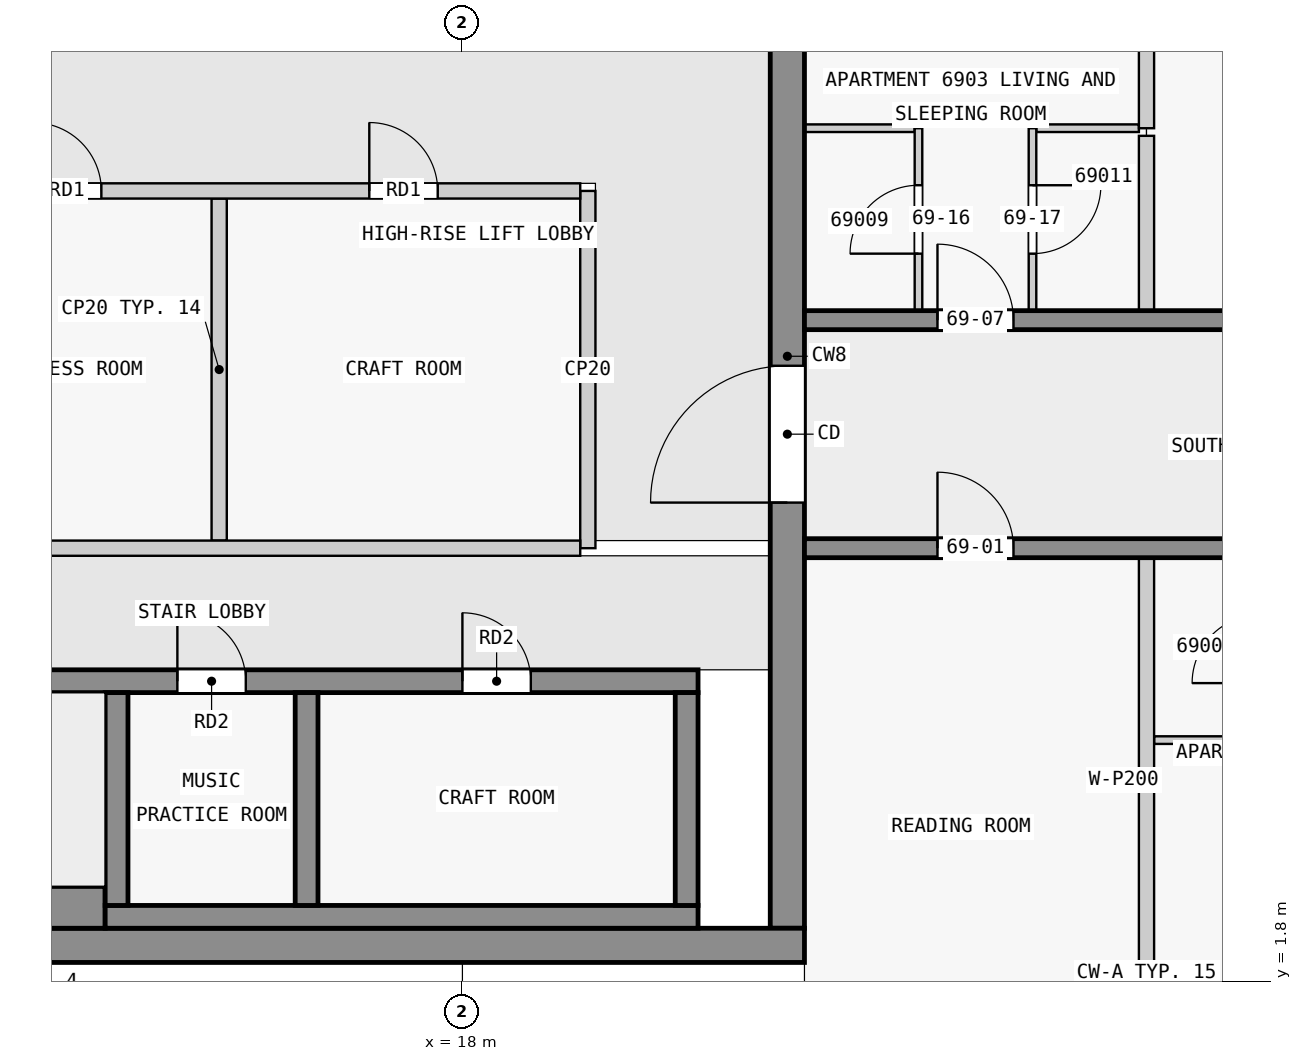
"""IFC4 building model, lengths in metres.
Left out: names, types, materials, properties, quantities, classifications, styles, units other than length and angle.
Written with IfcOpenShell. Run it as: python <this file> out.ifc"""

import sys

from ifc_helpers import new_model, si_unit, direction, frame, frame_2d, origin, place, context, subcontext, project, spatial, rectangle, extrude, element, fill, save


model = new_model("IFC4")
c1 = context("Model", 3, precision=1e-05, world=origin(), true_north=direction((0.0, 1.0)))
c2 = subcontext(c1, "Body", "Model", "MODEL_VIEW")
j1 = project(units=[si_unit("LENGTHUNIT", "METRE"), si_unit("PLANEANGLEUNIT", "RADIAN")], contexts=[c1])
p1 = place(None, origin())
s1 = spatial("IfcSite", under=j1, at=p1, CompositionType="ELEMENT")
p2 = place(p1, origin())
s2 = spatial("IfcBuilding", under=s1, at=p2, CompositionType="ELEMENT")
p3 = place(p2, frame((0.0, 0.0, 263.4)))
s3 = spatial("IfcBuildingStorey", under=s2, at=p3, CompositionType="ELEMENT", Elevation=263.4)
p4 = place(p3, frame((1.85, 2.275, 0.0), z_axis=(0.0, 0.0, 1.0), x_axis=(1.0, 0.0, 0.0)))
e1 = element("IfcWall", 1, at=p4, inside=s3, PredefinedType="SHEAR", context=c2, shape_type="SweptSolid", body=[
    extrude(rectangle(XDim=20.65, YDim=0.45, at=frame_2d((10.325, 0.0))), origin(), (0.0, 0.0, 1.0), 3.25),
])
p5 = place(p3, frame((22.275, 2.5, 0.0), z_axis=(0.0, 0.0, 1.0), x_axis=(0.0, 1.0, 0.0)))
e2 = element("IfcWall", 2, at=p5, inside=s3, PredefinedType="SHEAR", context=c2, shape_type="SweptSolid", body=[
    extrude(rectangle(XDim=15.05, YDim=0.45, at=frame_2d((7.525, 0.0))), origin(), (0.0, 0.0, 1.0), 3.25),
])
p6 = place(p5, frame((5.6, 0.0, 0.0)))
e3 = element("IfcOpeningElement", 3, at=p6, cuts=e2, PredefinedType="OPENING", context=c2, shape_type="SweptSolid", body=[
    extrude(rectangle(XDim=1.8, YDim=2.1, at=frame_2d((0.9, 1.05))), frame((0.0, 0.235, 0.0), z_axis=(0.0, -1.0, 0.0), x_axis=(1.0, 0.0, 0.0)), (0.0, 0.0, 1.0), 0.47),
])
p7 = place(p3, frame((6.9, 2.775, 0.0), z_axis=(0.0, 0.0, 1.0), x_axis=(1.0, 0.0, 0.0)))
e4 = element("IfcWall", 4, at=p7, inside=s3, PredefinedType="SHEAR", context=c2, shape_type="SweptSolid", body=[
    extrude(rectangle(XDim=6.4, YDim=0.55, at=frame_2d((3.2, 0.0))), origin(), (0.0, 0.0, 1.0), 3.25),
])
p8 = place(p3, frame((13.3, 2.65, 0.0), z_axis=(0.0, 0.0, 1.0), x_axis=(1.0, 0.0, 0.0)))
e5 = element("IfcWall", 5, at=p8, inside=s3, PredefinedType="SHEAR", context=c2, shape_type="SweptSolid", body=[
    extrude(rectangle(XDim=7.8, YDim=0.3, at=frame_2d((3.9, 0.0))), origin(), (0.0, 0.0, 1.0), 3.25),
])
for number, where, z_axis, x_axis in (
    (6, (13.45, 2.8, 0.0), (0.0, 0.0, 1.0), (0.0, 1.0, 0.0)),
    (7, (15.95, 2.8, 0.0), (0.0, 0.0, 1.0), (0.0, 1.0, 0.0)),
    (8, (20.95, 2.8, 0.0), (0.0, 0.0, 1.0), (0.0, 1.0, 0.0)),
):
    element("IfcWall", number, at=place(p3, frame(where, z_axis=z_axis, x_axis=x_axis)), inside=s3, PredefinedType="SHEAR", context=c2, shape_type="SweptSolid", body=[
        extrude(rectangle(XDim=2.8, YDim=0.3, at=frame_2d((1.4, 0.0))), origin(), (0.0, 0.0, 1.0), 3.25),
    ])
p9 = place(p3, frame((2.3, 5.75, 0.0), z_axis=(0.0, 0.0, 1.0), x_axis=(1.0, 0.0, 0.0)))
e9 = element("IfcWall", 9, at=p9, inside=s3, PredefinedType="SHEAR", context=c2, shape_type="SweptSolid", body=[
    extrude(rectangle(XDim=18.8, YDim=0.3, at=frame_2d((9.4, 0.0))), origin(), (0.0, 0.0, 1.0), 3.25),
])
p10 = place(p9, frame((4.65, 0.0, 0.0)))
e10 = element("IfcOpeningElement", 10, at=p10, cuts=e9, PredefinedType="OPENING", context=c2, shape_type="SweptSolid", body=[
    extrude(rectangle(XDim=1.1, YDim=2.1, at=frame_2d((0.55, 1.05))), frame((0.0, 0.16, 0.0), z_axis=(0.0, -1.0, 0.0), x_axis=(1.0, 0.0, 0.0)), (0.0, 0.0, 1.0), 0.32),
])
p11 = place(p9, frame((0.45, 0.0, 0.0)))
e11 = element("IfcOpeningElement", 11, at=p11, cuts=e9, PredefinedType="OPENING", context=c2, shape_type="SweptSolid", body=[
    extrude(rectangle(XDim=1.1, YDim=2.1, at=frame_2d((0.55, 1.05))), frame((0.0, 0.16, 0.0), z_axis=(0.0, -1.0, 0.0), x_axis=(1.0, 0.0, 0.0)), (0.0, 0.0, 1.0), 0.32),
])
p12 = place(p9, frame((2.75, 0.0, 0.0)))
e12 = element("IfcOpeningElement", 12, at=p12, cuts=e9, PredefinedType="OPENING", context=c2, shape_type="SweptSolid", body=[
    extrude(rectangle(XDim=1.1, YDim=2.1, at=frame_2d((0.55, 1.05))), frame((0.0, 0.16, 0.0), z_axis=(0.0, -1.0, 0.0), x_axis=(1.0, 0.0, 0.0)), (0.0, 0.0, 1.0), 0.32),
])
p13 = place(p9, frame((11.95, 0.0, 0.0)))
e13 = element("IfcOpeningElement", 13, at=p13, cuts=e9, PredefinedType="OPENING", context=c2, shape_type="SweptSolid", body=[
    extrude(rectangle(XDim=0.9, YDim=2.1, at=frame_2d((0.45, 1.05))), frame((0.0, 0.16, 0.0), z_axis=(0.0, -1.0, 0.0), x_axis=(1.0, 0.0, 0.0)), (0.0, 0.0, 1.0), 0.32),
])
p14 = place(p9, frame((15.7, 0.0, 0.0)))
e14 = element("IfcOpeningElement", 14, at=p14, cuts=e9, PredefinedType="OPENING", context=c2, shape_type="SweptSolid", body=[
    extrude(rectangle(XDim=0.9, YDim=2.1, at=frame_2d((0.45, 1.05))), frame((0.0, 0.16, 0.0), z_axis=(0.0, -1.0, 0.0), x_axis=(1.0, 0.0, 0.0)), (0.0, 0.0, 1.0), 0.32),
])
p15 = place(p3, frame((22.5, 7.5, 0.0), z_axis=(0.0, 0.0, 1.0), x_axis=(1.0, 0.0, 0.0)))
e15 = element("IfcWall", 15, at=p15, inside=s3, PredefinedType="SHEAR", context=c2, shape_type="SweptSolid", body=[
    extrude(rectangle(XDim=22.5, YDim=0.25, at=frame_2d((11.25, 0.0))), origin(), (0.0, 0.0, 1.0), 3.25),
])
p16 = place(p15, frame((1.75, 0.0, 0.0)))
e16 = element("IfcOpeningElement", 16, at=p16, cuts=e15, PredefinedType="OPENING", context=c2, shape_type="SweptSolid", body=[
    extrude(rectangle(XDim=1.0, YDim=2.1, at=frame_2d((0.5, 1.05))), frame((0.0, 0.135, 0.0), z_axis=(0.0, -1.0, 0.0), x_axis=(1.0, 0.0, 0.0)), (0.0, 0.0, 1.0), 0.27),
])
p17 = place(p15, frame((6.25, 0.0, 0.0)))
e17 = element("IfcOpeningElement", 17, at=p17, cuts=e15, PredefinedType="OPENING", context=c2, shape_type="SweptSolid", body=[
    extrude(rectangle(XDim=1.0, YDim=2.1, at=frame_2d((0.5, 1.05))), frame((0.0, 0.135, 0.0), z_axis=(0.0, -1.0, 0.0), x_axis=(1.0, 0.0, 0.0)), (0.0, 0.0, 1.0), 0.27),
])
p18 = place(p15, frame((10.35, 0.0, 0.0)))
e18 = element("IfcOpeningElement", 18, at=p18, cuts=e15, PredefinedType="OPENING", context=c2, shape_type="SweptSolid", body=[
    extrude(rectangle(XDim=1.8, YDim=2.1, at=frame_2d((0.9, 1.05))), frame((0.0, 0.135, 0.0), z_axis=(0.0, -1.0, 0.0), x_axis=(1.0, 0.0, 0.0)), (0.0, 0.0, 1.0), 0.27),
])
p19 = place(p15, frame((15.25, 0.0, 0.0)))
e19 = element("IfcOpeningElement", 19, at=p19, cuts=e15, PredefinedType="OPENING", context=c2, shape_type="SweptSolid", body=[
    extrude(rectangle(XDim=1.0, YDim=2.1, at=frame_2d((0.5, 1.05))), frame((0.0, 0.135, 0.0), z_axis=(0.0, -1.0, 0.0), x_axis=(1.0, 0.0, 0.0)), (0.0, 0.0, 1.0), 0.27),
])
p20 = place(p15, frame((18.75, 0.0, 0.0)))
e20 = element("IfcOpeningElement", 20, at=p20, cuts=e15, PredefinedType="OPENING", context=c2, shape_type="SweptSolid", body=[
    extrude(rectangle(XDim=0.9, YDim=2.1, at=frame_2d((0.45, 1.05))), frame((0.0, 0.135, 0.0), z_axis=(0.0, -1.0, 0.0), x_axis=(1.0, 0.0, 0.0)), (0.0, 0.0, 1.0), 0.27),
])
p21 = place(p15, frame((20.95, 0.0, 0.0)))
e21 = element("IfcOpeningElement", 21, at=p21, cuts=e15, PredefinedType="OPENING", context=c2, shape_type="SweptSolid", body=[
    extrude(rectangle(XDim=1.0, YDim=2.1, at=frame_2d((0.5, 1.05))), frame((0.0, 0.135, 0.0), z_axis=(0.0, -1.0, 0.0), x_axis=(1.0, 0.0, 0.0)), (0.0, 0.0, 1.0), 0.27),
])
p22 = place(p3, frame((22.5, 10.5, 0.0), z_axis=(0.0, 0.0, 1.0), x_axis=(1.0, 0.0, 0.0)))
e22 = element("IfcWall", 22, at=p22, inside=s3, PredefinedType="SHEAR", context=c2, shape_type="SweptSolid", body=[
    extrude(rectangle(XDim=22.5, YDim=0.25, at=frame_2d((11.25, 0.0))), origin(), (0.0, 0.0, 1.0), 3.25),
])
p23 = place(p22, frame((1.75, 0.0, 0.0)))
e23 = element("IfcOpeningElement", 23, at=p23, cuts=e22, PredefinedType="OPENING", context=c2, shape_type="SweptSolid", body=[
    extrude(rectangle(XDim=1.0, YDim=2.1, at=frame_2d((0.5, 1.05))), frame((0.0, 0.135, 0.0), z_axis=(0.0, -1.0, 0.0), x_axis=(1.0, 0.0, 0.0)), (0.0, 0.0, 1.0), 0.27),
])
p24 = place(p22, frame((8.55, 0.0, 0.0)))
e24 = element("IfcOpeningElement", 24, at=p24, cuts=e22, PredefinedType="OPENING", context=c2, shape_type="SweptSolid", body=[
    extrude(rectangle(XDim=1.0, YDim=2.1, at=frame_2d((0.5, 1.05))), frame((0.0, 0.135, 0.0), z_axis=(0.0, -1.0, 0.0), x_axis=(1.0, 0.0, 0.0)), (0.0, 0.0, 1.0), 0.27),
])
p25 = place(p22, frame((16.85, 0.0, 0.0)))
e25 = element("IfcOpeningElement", 25, at=p25, cuts=e22, PredefinedType="OPENING", context=c2, shape_type="SweptSolid", body=[
    extrude(rectangle(XDim=1.0, YDim=2.1, at=frame_2d((0.5, 1.05))), frame((0.0, 0.135, 0.0), z_axis=(0.0, -1.0, 0.0), x_axis=(1.0, 0.0, 0.0)), (0.0, 0.0, 1.0), 0.27),
])
p26 = place(p3, frame((10.9, 7.5, 0.0), z_axis=(0.0, 0.0, 1.0), x_axis=(1.0, 0.0, 0.0)))
e26 = element("IfcWall", 26, at=p26, inside=s3, PredefinedType="PARTITIONING", context=c2, shape_type="SweptSolid", body=[
    extrude(rectangle(XDim=8.65, YDim=0.2, at=frame_2d((4.325, 0.0))), origin(), (0.0, 0.0, 1.0), 3.25),
])
p27 = place(p3, frame((19.65, 7.5, 0.0), z_axis=(0.0, 0.0, 1.0), x_axis=(0.0, 1.0, 0.0)))
e27 = element("IfcWall", 27, at=p27, inside=s3, PredefinedType="PARTITIONING", context=c2, shape_type="SweptSolid", body=[
    extrude(rectangle(XDim=4.7, YDim=0.2, at=frame_2d((2.35, 0.0))), origin(), (0.0, 0.0, 1.0), 3.25),
])
p28 = place(p3, frame((10.9, 12.2, 0.0), z_axis=(0.0, 0.0, 1.0), x_axis=(1.0, 0.0, 0.0)))
e28 = element("IfcWall", 28, at=p28, inside=s3, PredefinedType="PARTITIONING", context=c2, shape_type="SweptSolid", body=[
    extrude(rectangle(XDim=8.65, YDim=0.2, at=frame_2d((4.325, 0.0))), origin(), (0.0, 0.0, 1.0), 3.25),
])
p29 = place(p28, frame((1.45, 0.0, 0.0)))
e29 = element("IfcOpeningElement", 29, at=p29, cuts=e28, PredefinedType="OPENING", context=c2, shape_type="SweptSolid", body=[
    extrude(rectangle(XDim=0.9, YDim=2.1, at=frame_2d((0.45, 1.05))), frame((0.0, 0.11, 0.0), z_axis=(0.0, -1.0, 0.0), x_axis=(1.0, 0.0, 0.0)), (0.0, 0.0, 1.0), 0.22),
])
p30 = place(p28, frame((5.875, 0.0, 0.0)))
e30 = element("IfcOpeningElement", 30, at=p30, cuts=e28, PredefinedType="OPENING", context=c2, shape_type="SweptSolid", body=[
    extrude(rectangle(XDim=0.9, YDim=2.1, at=frame_2d((0.45, 1.05))), frame((0.0, 0.11, 0.0), z_axis=(0.0, -1.0, 0.0), x_axis=(1.0, 0.0, 0.0)), (0.0, 0.0, 1.0), 0.22),
])
p31 = place(p3, frame((14.8, 7.6, 0.0), z_axis=(0.0, 0.0, 1.0), x_axis=(0.0, 1.0, 0.0)))
e31 = element("IfcWall", 31, at=p31, inside=s3, PredefinedType="PARTITIONING", context=c2, shape_type="SweptSolid", body=[
    extrude(rectangle(XDim=4.5, YDim=0.2, at=frame_2d((2.25, 0.0))), origin(), (0.0, 0.0, 1.0), 3.25),
])
p32 = place(p3, frame((27.1, 4.975, 0.0), z_axis=(0.0, 0.0, 1.0), x_axis=(1.0, 0.0, 0.0)))
e32 = element("IfcWall", 32, at=p32, inside=s3, PredefinedType="PARTITIONING", context=c2, shape_type="SweptSolid", body=[
    extrude(rectangle(XDim=1.35, YDim=0.1, at=frame_2d((0.675, 0.0))), origin(), (0.0, 0.0, 1.0), 3.25),
])
p33 = place(p3, frame((23.95, 13.025, 0.0), z_axis=(0.0, 0.0, 1.0), x_axis=(-1.0, 0.0, 0.0)))
e33 = element("IfcWall", 33, at=p33, inside=s3, PredefinedType="PARTITIONING", context=c2, shape_type="SweptSolid", body=[
    extrude(rectangle(XDim=1.45, YDim=0.1, at=frame_2d((0.725, 0.0))), origin(), (0.0, 0.0, 1.0), 3.25),
])
p34 = place(p3, frame((26.9, 13.025, 0.0), z_axis=(0.0, 0.0, 1.0), x_axis=(-1.0, 0.0, 0.0)))
e34 = element("IfcWall", 34, at=p34, inside=s3, PredefinedType="PARTITIONING", context=c2, shape_type="SweptSolid", body=[
    extrude(rectangle(XDim=1.35, YDim=0.1, at=frame_2d((0.675, 0.0))), origin(), (0.0, 0.0, 1.0), 3.25),
])
p35 = place(p3, frame((24.0, 10.625, 0.0), z_axis=(0.0, 0.0, 1.0), x_axis=(0.0, 1.0, 0.0)))
e35 = element("IfcWall", 35, at=p35, inside=s3, PredefinedType="PARTITIONING", context=c2, shape_type="SweptSolid", body=[
    extrude(rectangle(XDim=2.4, YDim=0.1, at=frame_2d((1.2, 0.0))), origin(), (0.0, 0.0, 1.0), 3.25),
])
p36 = place(p35, frame((0.75, 0.0, 0.0)))
e36 = element("IfcOpeningElement", 36, at=p36, cuts=e35, PredefinedType="OPENING", context=c2, shape_type="SweptSolid", body=[
    extrude(rectangle(XDim=0.9, YDim=2.1, at=frame_2d((0.45, 1.05))), frame((0.0, 0.06, 0.0), z_axis=(0.0, -1.0, 0.0), x_axis=(1.0, 0.0, 0.0)), (0.0, 0.0, 1.0), 0.12),
])
p37 = place(p3, frame((25.5, 13.025, 0.0), z_axis=(0.0, 0.0, 1.0), x_axis=(0.0, -1.0, 0.0)))
e37 = element("IfcWall", 37, at=p37, inside=s3, PredefinedType="PARTITIONING", context=c2, shape_type="SweptSolid", body=[
    extrude(rectangle(XDim=2.4, YDim=0.1, at=frame_2d((1.2, 0.0))), origin(), (0.0, 0.0, 1.0), 3.25),
])
p38 = place(p37, frame((0.75, 0.0, 0.0)))
e38 = element("IfcOpeningElement", 38, at=p38, cuts=e37, PredefinedType="OPENING", context=c2, shape_type="SweptSolid", body=[
    extrude(rectangle(XDim=0.9, YDim=2.1, at=frame_2d((0.45, 1.05))), frame((0.0, 0.06, 0.0), z_axis=(0.0, -1.0, 0.0), x_axis=(1.0, 0.0, 0.0)), (0.0, 0.0, 1.0), 0.12),
])
p39 = place(p3, frame((27.0, 16.473, 0.0), z_axis=(0.0, 0.0, 1.0), x_axis=(0.0, -1.0, 0.0)))
e39 = element("IfcWall", 39, at=p39, inside=s3, PredefinedType="PARTITIONING", context=c2, shape_type="SweptSolid", body=[
    extrude(rectangle(XDim=3.448, YDim=0.2, at=frame_2d((1.724, 0.0))), origin(), (0.0, 0.0, 1.0), 3.25),
])
p40 = place(p3, frame((27.0, 1.527, 0.0), z_axis=(0.0, 0.0, 1.0), x_axis=(0.0, 1.0, 0.0)))
e40 = element("IfcWall", 40, at=p40, inside=s3, PredefinedType="PARTITIONING", context=c2, shape_type="SweptSolid", body=[
    extrude(rectangle(XDim=5.848, YDim=0.2, at=frame_2d((2.924, 0.0))), origin(), (0.0, 0.0, 1.0), 3.25),
])
p41 = place(p3, frame((27.0, 10.625, 0.0), z_axis=(0.0, 0.0, 1.0), x_axis=(0.0, 1.0, 0.0)))
e41 = element("IfcWall", 41, at=p41, inside=s3, PredefinedType="PARTITIONING", context=c2, shape_type="SweptSolid", body=[
    extrude(rectangle(XDim=2.3, YDim=0.2, at=frame_2d((1.15, 0.0))), origin(), (0.0, 0.0, 1.0), 3.25),
])
p42 = place(p29, origin())
e42 = element("IfcDoor", 42, at=p42, inside=s3, OperationType="SINGLE_SWING_LEFT", PredefinedType="DOOR", context=c2, shape_type="SweptSolid", body=[
    extrude(rectangle(XDim=0.9, YDim=2.1, at=frame_2d((0.45, 1.05))), frame((0.0, 0.025, 0.0), z_axis=(0.0, -1.0, 0.0), x_axis=(1.0, 0.0, 0.0)), (0.0, 0.0, 1.0), 0.05),
])
fill(e29, e42)
p43 = place(p30, origin())
e43 = element("IfcDoor", 43, at=p43, inside=s3, OperationType="SINGLE_SWING_LEFT", PredefinedType="DOOR", context=c2, shape_type="SweptSolid", body=[
    extrude(rectangle(XDim=0.9, YDim=2.1, at=frame_2d((0.45, 1.05))), frame((0.0, 0.025, 0.0), z_axis=(0.0, -1.0, 0.0), x_axis=(1.0, 0.0, 0.0)), (0.0, 0.0, 1.0), 0.05),
])
fill(e30, e43)
p44 = place(p6, origin())
e44 = element("IfcDoor", 44, at=p44, inside=s3, OperationType="DOUBLE_DOOR_SINGLE_SWING", PredefinedType="DOOR", context=c2, shape_type="SweptSolid", body=[
    extrude(rectangle(XDim=1.8, YDim=2.1, at=frame_2d((0.9, 1.05))), frame((0.0, 0.025, 0.0), z_axis=(0.0, -1.0, 0.0), x_axis=(1.0, 0.0, 0.0)), (0.0, 0.0, 1.0), 0.05),
])
fill(e3, e44)
p45 = place(p13, origin())
e45 = element("IfcDoor", 45, at=p45, inside=s3, OperationType="SINGLE_SWING_LEFT", PredefinedType="DOOR", context=c2, shape_type="SweptSolid", body=[
    extrude(rectangle(XDim=0.9, YDim=2.1, at=frame_2d((0.45, 1.05))), frame((0.0, 0.025, 0.0), z_axis=(0.0, -1.0, 0.0), x_axis=(1.0, 0.0, 0.0)), (0.0, 0.0, 1.0), 0.05),
])
fill(e13, e45)
p46 = place(p14, origin())
e46 = element("IfcDoor", 46, at=p46, inside=s3, OperationType="SINGLE_SWING_LEFT", PredefinedType="DOOR", context=c2, shape_type="SweptSolid", body=[
    extrude(rectangle(XDim=0.9, YDim=2.1, at=frame_2d((0.45, 1.05))), frame((0.0, 0.025, 0.0), z_axis=(0.0, -1.0, 0.0), x_axis=(1.0, 0.0, 0.0)), (0.0, 0.0, 1.0), 0.05),
])
fill(e14, e46)
p47 = place(p16, origin())
e47 = element("IfcDoor", 47, at=p47, inside=s3, OperationType="SINGLE_SWING_LEFT", PredefinedType="DOOR", context=c2, shape_type="SweptSolid", body=[
    extrude(rectangle(XDim=1.0, YDim=2.1, at=frame_2d((0.5, 1.05))), frame((0.0, 0.025, 0.0), z_axis=(0.0, -1.0, 0.0), x_axis=(1.0, 0.0, 0.0)), (0.0, 0.0, 1.0), 0.05),
])
fill(e16, e47)
p48 = place(p23, origin())
e48 = element("IfcDoor", 48, at=p48, inside=s3, OperationType="SINGLE_SWING_LEFT", PredefinedType="DOOR", context=c2, shape_type="SweptSolid", body=[
    extrude(rectangle(XDim=1.0, YDim=2.1, at=frame_2d((0.5, 1.05))), frame((0.0, 0.025, 0.0), z_axis=(0.0, -1.0, 0.0), x_axis=(1.0, 0.0, 0.0)), (0.0, 0.0, 1.0), 0.05),
])
fill(e23, e48)
p49 = place(p36, origin())
e49 = element("IfcDoor", 49, at=p49, inside=s3, OperationType="SINGLE_SWING_LEFT", PredefinedType="DOOR", context=c2, shape_type="SweptSolid", body=[
    extrude(rectangle(XDim=0.9, YDim=2.1, at=frame_2d((0.45, 1.05))), frame((0.0, 0.025, 0.0), z_axis=(0.0, -1.0, 0.0), x_axis=(1.0, 0.0, 0.0)), (0.0, 0.0, 1.0), 0.05),
])
fill(e36, e49)
p50 = place(p38, origin())
e50 = element("IfcDoor", 50, at=p50, inside=s3, OperationType="SINGLE_SWING_LEFT", PredefinedType="DOOR", context=c2, shape_type="SweptSolid", body=[
    extrude(rectangle(XDim=0.9, YDim=2.1, at=frame_2d((0.45, 1.05))), frame((0.0, 0.025, 0.0), z_axis=(0.0, -1.0, 0.0), x_axis=(1.0, 0.0, 0.0)), (0.0, 0.0, 1.0), 0.05),
])
fill(e38, e50)
save(model, sys.argv[1])
